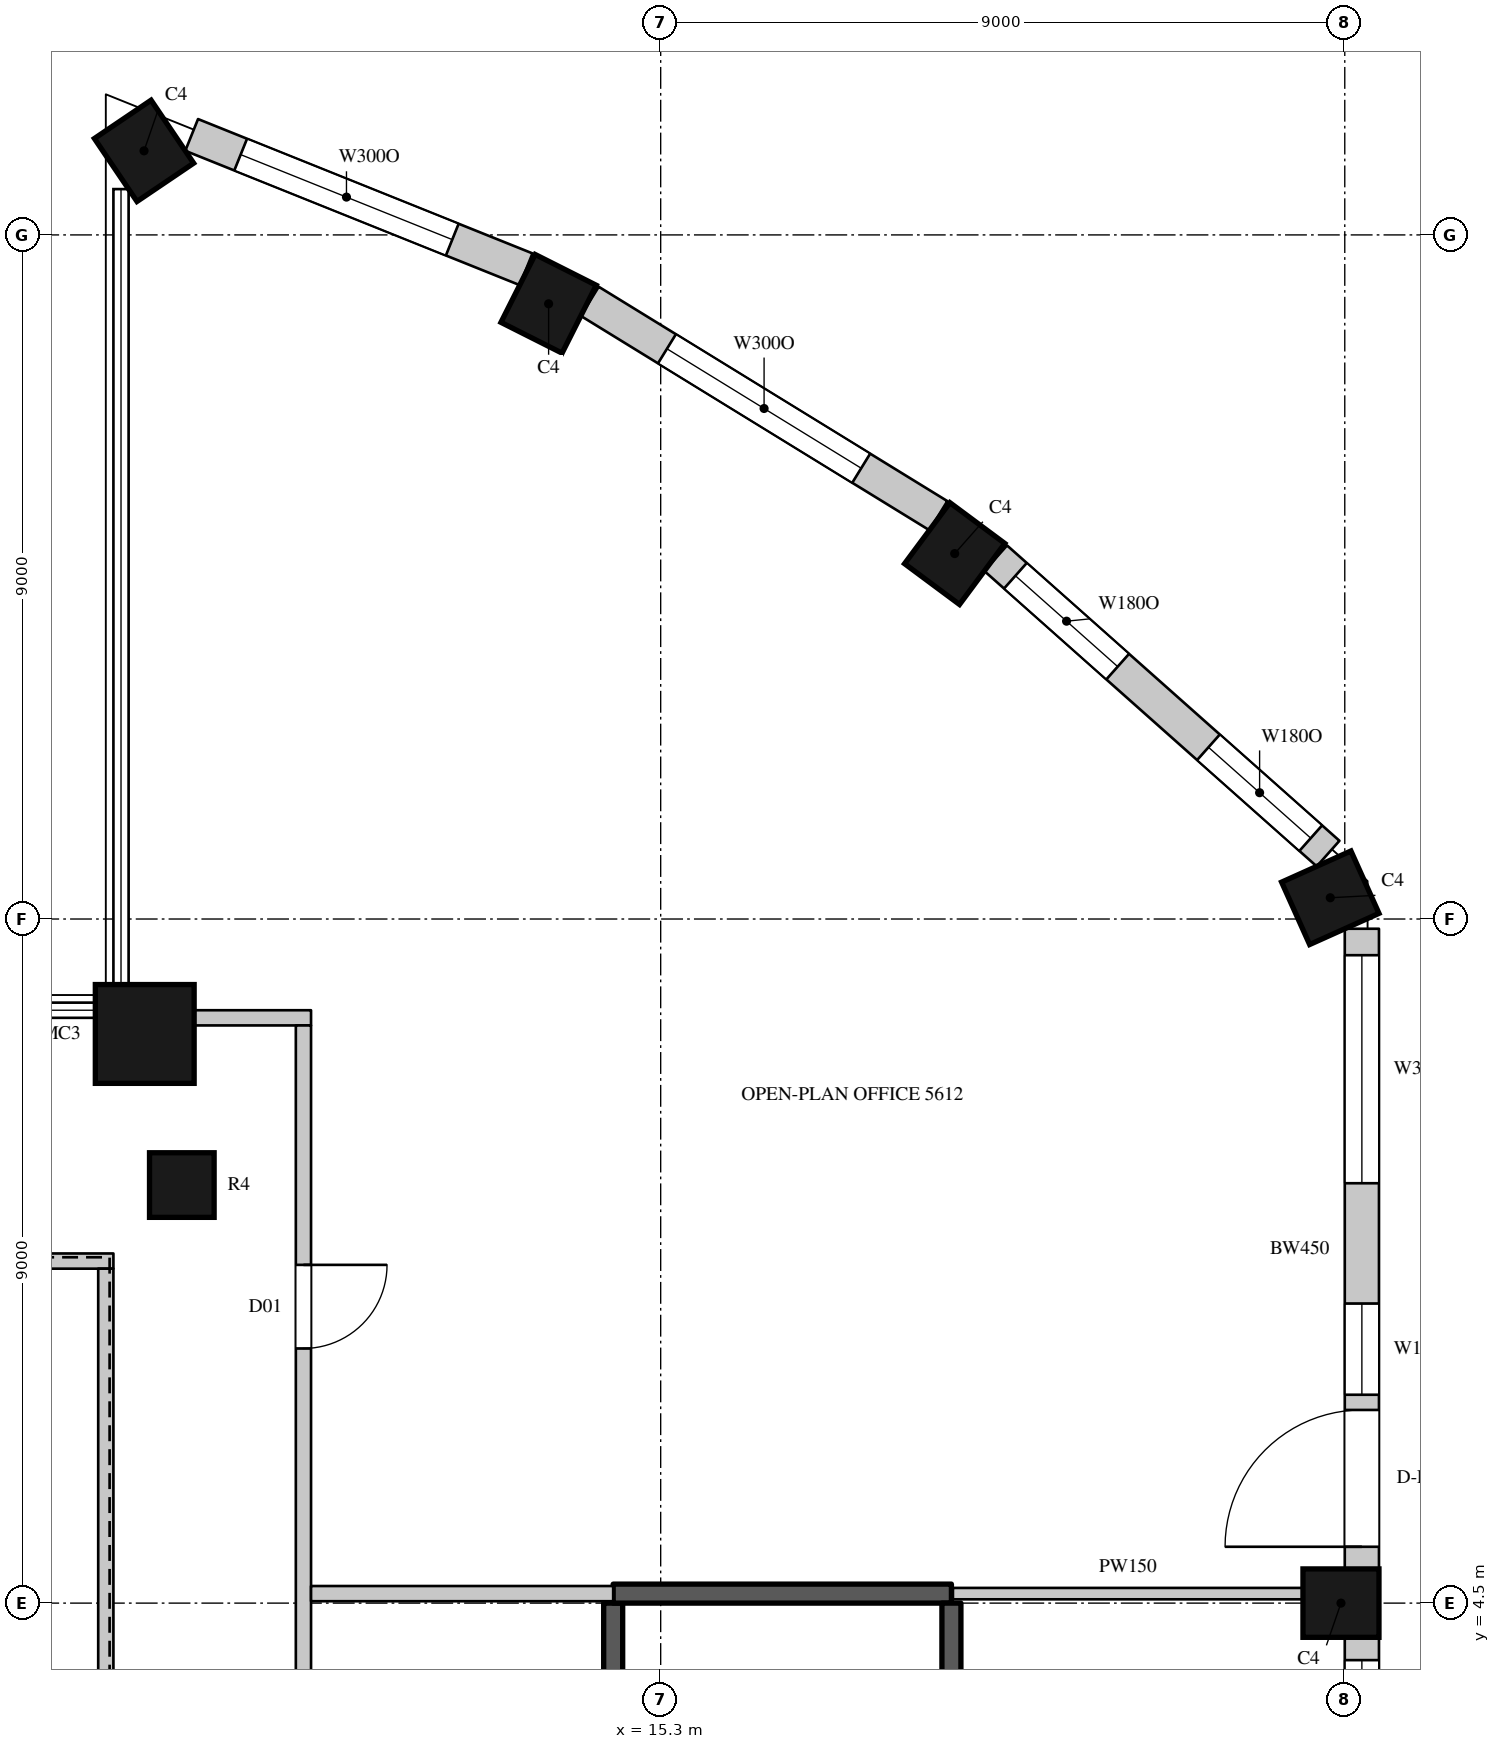
"""IFC4 building model, lengths in metres.
Left out: names, types, materials, properties, quantities, classifications, styles, units other than length and angle.
Written with IfcOpenShell. Run it as: python <this file> out.ifc"""

import sys

from ifc_helpers import new_model, si_unit, direction, frame, frame_2d, origin, origin_2d, place, context, subcontext, project, spatial, rectangle, circle, extrude, element, fill, save


model = new_model("IFC4")
c1 = context("Model", 3, precision=1e-05, world=origin(), true_north=direction((0.0, 1.0)))
c2 = subcontext(c1, "Body", "Model", "MODEL_VIEW")
j1 = project(units=[si_unit("LENGTHUNIT", "METRE"), si_unit("PLANEANGLEUNIT", "RADIAN")], contexts=[c1])
p1 = place(None, origin())
s1 = spatial("IfcSite", under=j1, at=p1, CompositionType="ELEMENT")
p2 = place(p1, origin())
s2 = spatial("IfcBuilding", under=s1, at=p2, CompositionType="ELEMENT")
p3 = place(p2, frame((0.0, 0.0, 251.6)))
s3 = spatial("IfcBuildingStorey", under=s2, at=p3, CompositionType="ELEMENT", Elevation=251.6)
p4 = place(p3, frame((8.503, 23.606, 0.0), z_axis=(0.0, 0.0, 1.0), x_axis=(-0.828469606019, -0.560034027451, 0.0)))
e1 = element("IfcColumn", 1, at=p4, inside=s3, PredefinedType="COLUMN", context=c2, shape_type="SweptSolid", body=[
    extrude(rectangle(XDim=0.9, YDim=1.0, at=origin_2d()), origin(), (0.0, 0.0, 1.0), 4.1),
])
p5 = place(p3, frame((8.512, 11.988, 0.0), z_axis=(0.0, 0.0, 1.0), x_axis=(1.0, 0.0, 0.0)))
e2 = element("IfcColumn", 2, at=p5, inside=s3, PredefinedType="COLUMN", context=c2, shape_type="SweptSolid", body=[
    extrude(circle(Radius=0.65, at=origin_2d()), origin(), (0.0, 0.0, 1.0), 4.1),
])
for number, where, z_axis, x_axis in (
    (3, (24.25, 4.5, 0.0), (0.0, 0.0, 1.0), (0.0, 1.0, 0.0)),
    (4, (24.11, 13.78, 0.0), (0.0, 0.0, 1.0), (-0.41, 0.912, 0.0)),
    (5, (19.168, 18.308, 0.0), (0.0, 0.0, 1.0), (-0.803, 0.596, 0.0)),
    (6, (13.826, 21.594, 0.0), (0.0, 0.0, 1.0), (-0.893, 0.45, 0.0)),
):
    element("IfcColumn", number, at=place(p3, frame(where, z_axis=z_axis, x_axis=x_axis)), inside=s3, PredefinedType="COLUMN", context=c2, shape_type="SweptSolid", body=[
        extrude(rectangle(XDim=0.9, YDim=1.0, at=origin_2d()), origin(), (0.0, 0.0, 1.0), 4.1),
    ])
p6 = place(p3, frame((9.0, 10.0, 0.0), z_axis=(0.0, 0.0, 1.0), x_axis=(1.0, 0.0, 0.0)))
e7 = element("IfcColumn", 7, at=p6, inside=s3, PredefinedType="COLUMN", context=c2, shape_type="SweptSolid", body=[
    extrude(circle(Radius=0.425, at=origin_2d()), origin(), (0.0, 0.0, 1.0), 4.1),
])
p7 = place(p3, frame((24.525, -4.05, 0.0), z_axis=(0.0, 0.0, 1.0), x_axis=(0.0, 1.0, 0.0)))
e8 = element("IfcWall", 8, at=p7, inside=s3, PredefinedType="SOLIDWALL", context=c2, shape_type="SweptSolid", body=[
    extrude(rectangle(XDim=8.1, YDim=0.45, at=frame_2d((4.05, 0.0))), origin(), (0.0, 0.0, 1.0), 3.8),
])
p8 = place(p7, frame((0.3, 0.0, 1.05)))
e9 = element("IfcOpeningElement", 9, at=p8, cuts=e8, PredefinedType="OPENING", context=c2, shape_type="SweptSolid", body=[
    extrude(rectangle(XDim=3.0, YDim=2.4, at=frame_2d((1.5, 1.2))), frame((0.0, 0.235, 0.0), z_axis=(0.0, -1.0, 0.0), x_axis=(1.0, 0.0, 0.0)), (0.0, 0.0, 1.0), 0.47),
])
p9 = place(p7, frame((4.8, 0.0, 1.05)))
e10 = element("IfcOpeningElement", 10, at=p9, cuts=e8, PredefinedType="OPENING", context=c2, shape_type="SweptSolid", body=[
    extrude(rectangle(XDim=3.0, YDim=2.4, at=frame_2d((1.5, 1.2))), frame((0.0, 0.235, 0.0), z_axis=(0.0, -1.0, 0.0), x_axis=(1.0, 0.0, 0.0)), (0.0, 0.0, 1.0), 0.47),
])
p10 = place(p3, frame((24.525, 4.95, 0.0), z_axis=(0.0, 0.0, 1.0), x_axis=(0.0, 1.0, 0.0)))
e11 = element("IfcWall", 11, at=p10, inside=s3, PredefinedType="SOLIDWALL", context=c2, shape_type="SweptSolid", body=[
    extrude(rectangle(XDim=8.422, YDim=0.45, at=frame_2d((4.211, 0.0))), origin(), (0.0, 0.0, 1.0), 3.8),
])
p11 = place(p10, frame((0.291, 0.0, 0.0)))
e12 = element("IfcOpeningElement", 12, at=p11, cuts=e11, PredefinedType="OPENING", context=c2, shape_type="SweptSolid", body=[
    extrude(rectangle(XDim=1.8, YDim=2.4, at=frame_2d((0.9, 1.2))), frame((0.0, 0.235, 0.0), z_axis=(0.0, -1.0, 0.0), x_axis=(1.0, 0.0, 0.0)), (0.0, 0.0, 1.0), 0.47),
])
p12 = place(p10, frame((2.291, 0.0, 1.05)))
e13 = element("IfcOpeningElement", 13, at=p12, cuts=e11, PredefinedType="OPENING", context=c2, shape_type="SweptSolid", body=[
    extrude(rectangle(XDim=1.2, YDim=2.4, at=frame_2d((0.6, 1.2))), frame((0.0, 0.235, 0.0), z_axis=(0.0, -1.0, 0.0), x_axis=(1.0, 0.0, 0.0)), (0.0, 0.0, 1.0), 0.47),
])
p13 = place(p10, frame((5.074, 0.0, 1.05)))
e14 = element("IfcOpeningElement", 14, at=p13, cuts=e11, PredefinedType="OPENING", context=c2, shape_type="SweptSolid", body=[
    extrude(rectangle(XDim=3.0, YDim=2.4, at=frame_2d((1.5, 1.2))), frame((0.0, 0.235, 0.0), z_axis=(0.0, -1.0, 0.0), x_axis=(1.0, 0.0, 0.0)), (0.0, 0.0, 1.0), 0.47),
])
p14 = place(p3, frame((24.081, 14.361, 0.0), z_axis=(0.0, 0.0, 1.0), x_axis=(-0.747570482973, 0.664182484704, 0.0)))
e15 = element("IfcWall", 15, at=p14, inside=s3, PredefinedType="SOLIDWALL", context=c2, shape_type="SweptSolid", body=[
    extrude(rectangle(XDim=5.85, YDim=0.45, at=frame_2d((2.925, 0.0))), origin(), (0.0, 0.0, 1.0), 3.8),
])
p15 = place(p14, frame((0.305, 0.0, 1.05)))
e16 = element("IfcOpeningElement", 16, at=p15, cuts=e15, PredefinedType="OPENING", context=c2, shape_type="SweptSolid", body=[
    extrude(rectangle(XDim=1.8, YDim=2.4, at=frame_2d((0.9, 1.2))), frame((0.0, 0.235, 0.0), z_axis=(0.0, -1.0, 0.0), x_axis=(1.0, 0.0, 0.0)), (0.0, 0.0, 1.0), 0.47),
])
p16 = place(p14, frame((3.703, 0.0, 1.05)))
e17 = element("IfcOpeningElement", 17, at=p16, cuts=e15, PredefinedType="OPENING", context=c2, shape_type="SweptSolid", body=[
    extrude(rectangle(XDim=1.8, YDim=2.4, at=frame_2d((0.9, 1.2))), frame((0.0, 0.235, 0.0), z_axis=(0.0, -1.0, 0.0), x_axis=(1.0, 0.0, 0.0)), (0.0, 0.0, 1.0), 0.47),
])
p17 = place(p3, frame((18.953, 18.806, 0.0), z_axis=(0.0, 0.0, 1.0), x_axis=(-0.851860664503, 0.523768468193, 0.0)))
e18 = element("IfcWall", 18, at=p17, inside=s3, PredefinedType="SOLIDWALL", context=c2, shape_type="SweptSolid", body=[
    extrude(rectangle(XDim=5.384, YDim=0.45, at=frame_2d((2.692, 0.0))), origin(), (0.0, 0.0, 1.0), 3.8),
])
p18 = place(p17, frame((1.192, 0.0, 1.05)))
e19 = element("IfcOpeningElement", 19, at=p18, cuts=e18, PredefinedType="OPENING", context=c2, shape_type="SweptSolid", body=[
    extrude(rectangle(XDim=3.0, YDim=2.4, at=frame_2d((1.5, 1.2))), frame((0.0, 0.235, 0.0), z_axis=(0.0, -1.0, 0.0), x_axis=(1.0, 0.0, 0.0)), (0.0, 0.0, 1.0), 0.47),
])
p19 = place(p3, frame((13.529, 22.048, 0.0), z_axis=(0.0, 0.0, 1.0), x_axis=(-0.927957332619, 0.372686448424, 0.0)))
e20 = element("IfcWall", 20, at=p19, inside=s3, PredefinedType="SOLIDWALL", context=c2, shape_type="SweptSolid", body=[
    extrude(rectangle(XDim=4.741, YDim=0.45, at=frame_2d((2.371, 0.0))), origin(), (0.0, 0.0, 1.0), 3.8),
])
p20 = place(p19, frame((1.047, 0.0, 1.05)))
e21 = element("IfcOpeningElement", 21, at=p20, cuts=e20, PredefinedType="OPENING", context=c2, shape_type="SweptSolid", body=[
    extrude(rectangle(XDim=3.0, YDim=2.4, at=frame_2d((1.5, 1.2))), frame((0.0, 0.235, 0.0), z_axis=(0.0, -1.0, 0.0), x_axis=(1.0, 0.0, 0.0)), (0.0, 0.0, 1.0), 0.47),
])
p21 = place(p3, frame((1.02, 9.0, 0.0), z_axis=(0.0, 0.0, 1.0), x_axis=(1.0, 0.0, 0.0)))
e22 = element("IfcWall", 22, at=p21, inside=s3, PredefinedType="PARTITIONING", context=c2, shape_type="SweptSolid", body=[
    extrude(rectangle(XDim=7.08, YDim=0.2, at=frame_2d((3.54, 0.0))), origin(), (0.0, 0.0, 1.0), 3.8),
])
p22 = place(p3, frame((8.0, -8.9, 0.0), z_axis=(0.0, 0.0, 1.0), x_axis=(0.0, 1.0, 0.0)))
e23 = element("IfcWall", 23, at=p22, inside=s3, PredefinedType="PARTITIONING", context=c2, shape_type="SweptSolid", body=[
    extrude(rectangle(XDim=17.8, YDim=0.2, at=frame_2d((8.9, 0.0))), origin(), (0.0, 0.0, 1.0), 3.8),
])
p23 = place(p3, frame((9.144, 12.2, 0.0), z_axis=(0.0, 0.0, 1.0), x_axis=(1.0, 0.0, 0.0)))
e24 = element("IfcWall", 24, at=p23, inside=s3, PredefinedType="PARTITIONING", context=c2, shape_type="SweptSolid", body=[
    extrude(rectangle(XDim=1.556, YDim=0.2, at=frame_2d((0.778, 0.0))), origin(), (0.0, 0.0, 1.0), 3.8),
])
p24 = place(p3, frame((10.6, -11.6, 0.0), z_axis=(0.0, 0.0, 1.0), x_axis=(0.0, 1.0, 0.0)))
e25 = element("IfcWall", 25, at=p24, inside=s3, PredefinedType="PARTITIONING", context=c2, shape_type="SweptSolid", body=[
    extrude(rectangle(XDim=23.7, YDim=0.2, at=frame_2d((11.85, 0.0))), origin(), (0.0, 0.0, 1.0), 3.8),
])
p25 = place(p24, frame((9.45, 0.0, 0.0)))
e26 = element("IfcOpeningElement", 26, at=p25, cuts=e25, PredefinedType="OPENING", context=c2, shape_type="SweptSolid", body=[
    extrude(rectangle(XDim=1.5, YDim=2.4, at=frame_2d((0.75, 1.2))), frame((0.0, 0.11, 0.0), z_axis=(0.0, -1.0, 0.0), x_axis=(1.0, 0.0, 0.0)), (0.0, 0.0, 1.0), 0.22),
])
p26 = place(p24, frame((19.45, 0.0, 0.0)))
e27 = element("IfcOpeningElement", 27, at=p26, cuts=e25, PredefinedType="OPENING", context=c2, shape_type="SweptSolid", body=[
    extrude(rectangle(XDim=1.1, YDim=2.4, at=frame_2d((0.55, 1.2))), frame((0.0, 0.11, 0.0), z_axis=(0.0, -1.0, 0.0), x_axis=(1.0, 0.0, 0.0)), (0.0, 0.0, 1.0), 0.22),
])
p27 = place(p24, frame((4.6, 0.0, 0.0)))
e28 = element("IfcOpeningElement", 28, at=p27, cuts=e25, PredefinedType="OPENING", context=c2, shape_type="SweptSolid", body=[
    extrude(rectangle(XDim=1.1, YDim=2.4, at=frame_2d((0.55, 1.2))), frame((0.0, 0.11, 0.0), z_axis=(0.0, -1.0, 0.0), x_axis=(1.0, 0.0, 0.0)), (0.0, 0.0, 1.0), 0.22),
])
p28 = place(p3, frame((10.7, 4.625, 0.0), z_axis=(0.0, 0.0, 1.0), x_axis=(1.0, 0.0, 0.0)))
e29 = element("IfcWall", 29, at=p28, inside=s3, PredefinedType="PARTITIONING", context=c2, shape_type="SweptSolid", body=[
    extrude(rectangle(XDim=3.975, YDim=0.2, at=frame_2d((1.988, 0.0))), origin(), (0.0, 0.0, 1.0), 3.8),
])
p29 = place(p3, frame((19.145, 4.625, 0.0), z_axis=(0.0, 0.0, 1.0), x_axis=(1.0, 0.0, 0.0)))
e30 = element("IfcWall", 30, at=p29, inside=s3, PredefinedType="PARTITIONING", context=c2, shape_type="SweptSolid", body=[
    extrude(rectangle(XDim=4.605, YDim=0.15, at=frame_2d((2.302, 0.0))), origin(), (0.0, 0.0, 1.0), 3.8),
])
p30 = place(p3, frame((14.675, -4.5, 0.0), z_axis=(0.0, 0.0, 1.0), x_axis=(0.0, 1.0, 0.0)))
e31 = element("IfcWall", 31, at=p30, inside=s3, PredefinedType="SHEAR", context=c2, shape_type="SweptSolid", body=[
    extrude(rectangle(XDim=9.0, YDim=0.25, at=frame_2d((4.5, 0.0))), origin(), (0.0, 0.0, 1.0), 3.8),
])
p31 = place(p30, frame((0.45, 0.0, 0.0)))
e32 = element("IfcOpeningElement", 32, at=p31, cuts=e31, PredefinedType="OPENING", context=c2, shape_type="SweptSolid", body=[
    extrude(rectangle(XDim=1.1, YDim=2.2, at=frame_2d((0.55, 1.1))), frame((0.0, 0.135, 0.0), z_axis=(0.0, -1.0, 0.0), x_axis=(1.0, 0.0, 0.0)), (0.0, 0.0, 1.0), 0.27),
])
p32 = place(p3, frame((14.675, 4.625, 0.0), z_axis=(0.0, 0.0, 1.0), x_axis=(1.0, 0.0, 0.0)))
e33 = element("IfcWall", 33, at=p32, inside=s3, PredefinedType="SHEAR", context=c2, shape_type="SweptSolid", body=[
    extrude(rectangle(XDim=4.45, YDim=0.25, at=frame_2d((2.225, 0.0))), origin(), (0.0, 0.0, 1.0), 3.8),
])
p33 = place(p3, frame((19.125, -4.5, 0.0), z_axis=(0.0, 0.0, 1.0), x_axis=(0.0, 1.0, 0.0)))
e34 = element("IfcWall", 34, at=p33, inside=s3, PredefinedType="SHEAR", context=c2, shape_type="SweptSolid", body=[
    extrude(rectangle(XDim=9.0, YDim=0.25, at=frame_2d((4.5, 0.0))), origin(), (0.0, 0.0, 1.0), 3.8),
])
p34 = place(p9, origin())
e35 = element("IfcWindow", 35, at=p34, inside=s3, PartitioningType="SINGLE_PANEL", PredefinedType="WINDOW", context=c2, shape_type="SweptSolid", body=[
    extrude(rectangle(XDim=3.0, YDim=2.4, at=frame_2d((1.5, 1.2))), frame((0.0, 0.135, 0.0), z_axis=(0.0, -1.0, 0.0), x_axis=(1.0, 0.0, 0.0)), (0.0, 0.0, 1.0), 0.06),
])
fill(e10, e35)
p35 = place(p11, origin())
e36 = element("IfcDoor", 36, at=p35, inside=s3, OperationType="SLIDING_TO_LEFT", PredefinedType="DOOR", context=c2, shape_type="SweptSolid", body=[
    extrude(rectangle(XDim=1.8, YDim=2.4, at=frame_2d((0.9, 1.2))), frame((0.0, 0.13, 0.0), z_axis=(0.0, -1.0, 0.0), x_axis=(1.0, 0.0, 0.0)), (0.0, 0.0, 1.0), 0.05),
])
fill(e12, e36)
p36 = place(p12, origin())
e37 = element("IfcWindow", 37, at=p36, inside=s3, PartitioningType="SINGLE_PANEL", PredefinedType="WINDOW", context=c2, shape_type="SweptSolid", body=[
    extrude(rectangle(XDim=1.2, YDim=2.4, at=frame_2d((0.6, 1.2))), frame((0.0, 0.135, 0.0), z_axis=(0.0, -1.0, 0.0), x_axis=(1.0, 0.0, 0.0)), (0.0, 0.0, 1.0), 0.06),
])
fill(e13, e37)
p37 = place(p13, origin())
e38 = element("IfcWindow", 38, at=p37, inside=s3, PartitioningType="SINGLE_PANEL", PredefinedType="WINDOW", context=c2, shape_type="SweptSolid", body=[
    extrude(rectangle(XDim=3.0, YDim=2.4, at=frame_2d((1.5, 1.2))), frame((0.0, 0.135, 0.0), z_axis=(0.0, -1.0, 0.0), x_axis=(1.0, 0.0, 0.0)), (0.0, 0.0, 1.0), 0.06),
])
fill(e14, e38)
p38 = place(p15, origin())
e39 = element("IfcWindow", 39, at=p38, inside=s3, PartitioningType="SINGLE_PANEL", PredefinedType="WINDOW", context=c2, shape_type="SweptSolid", body=[
    extrude(rectangle(XDim=1.8, YDim=2.4, at=frame_2d((0.9, 1.2))), frame((0.0, 0.135, 0.0), z_axis=(0.0, -1.0, 0.0), x_axis=(1.0, 0.0, 0.0)), (0.0, 0.0, 1.0), 0.06),
])
fill(e16, e39)
p39 = place(p16, origin())
e40 = element("IfcWindow", 40, at=p39, inside=s3, PartitioningType="SINGLE_PANEL", PredefinedType="WINDOW", context=c2, shape_type="SweptSolid", body=[
    extrude(rectangle(XDim=1.8, YDim=2.4, at=frame_2d((0.9, 1.2))), frame((0.0, 0.135, 0.0), z_axis=(0.0, -1.0, 0.0), x_axis=(1.0, 0.0, 0.0)), (0.0, 0.0, 1.0), 0.06),
])
fill(e17, e40)
p40 = place(p18, origin())
e41 = element("IfcWindow", 41, at=p40, inside=s3, PartitioningType="SINGLE_PANEL", PredefinedType="WINDOW", context=c2, shape_type="SweptSolid", body=[
    extrude(rectangle(XDim=3.0, YDim=2.4, at=frame_2d((1.5, 1.2))), frame((0.0, 0.135, 0.0), z_axis=(0.0, -1.0, 0.0), x_axis=(1.0, 0.0, 0.0)), (0.0, 0.0, 1.0), 0.06),
])
fill(e19, e41)
p41 = place(p20, origin())
e42 = element("IfcWindow", 42, at=p41, inside=s3, PartitioningType="SINGLE_PANEL", PredefinedType="WINDOW", context=c2, shape_type="SweptSolid", body=[
    extrude(rectangle(XDim=3.0, YDim=2.4, at=frame_2d((1.5, 1.2))), frame((0.0, 0.135, 0.0), z_axis=(0.0, -1.0, 0.0), x_axis=(1.0, 0.0, 0.0)), (0.0, 0.0, 1.0), 0.06),
])
fill(e21, e42)
p42 = place(p26, origin())
e43 = element("IfcDoor", 43, at=p42, inside=s3, OperationType="SINGLE_SWING_LEFT", PredefinedType="DOOR", context=c2, shape_type="SweptSolid", body=[
    extrude(rectangle(XDim=1.1, YDim=2.4, at=frame_2d((0.55, 1.2))), frame((0.0, 0.025, 0.0), z_axis=(0.0, -1.0, 0.0), x_axis=(1.0, 0.0, 0.0)), (0.0, 0.0, 1.0), 0.05),
])
fill(e27, e43)
save(model, sys.argv[1])
